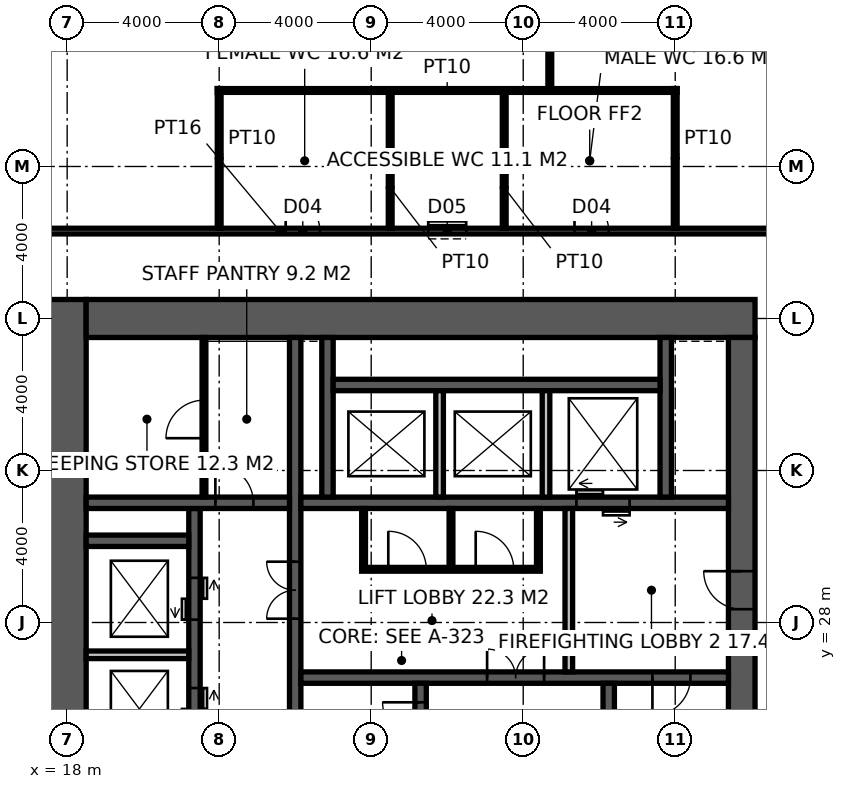
"""IFC4 building model, lengths in metres.
Left out: names, types, materials, properties, quantities, classifications, styles, units other than length and angle.
Written with IfcOpenShell. Run it as: python <this file> out.ifc"""

import sys

from ifc_helpers import new_model, si_unit, direction, frame, frame_2d, origin, place, context, subcontext, project, spatial, rectangle, extrude, element, fill, save


model = new_model("IFC4")
c1 = context("Model", 3, precision=1e-05, world=origin(), true_north=direction((0.0, 1.0)))
c2 = subcontext(c1, "Body", "Model", "MODEL_VIEW")
j1 = project(units=[si_unit("LENGTHUNIT", "METRE"), si_unit("PLANEANGLEUNIT", "RADIAN")], contexts=[c1])
p1 = place(None, origin())
s1 = spatial("IfcSite", under=j1, at=p1, CompositionType="ELEMENT")
p2 = place(p1, origin())
s2 = spatial("IfcBuilding", under=s1, at=p2, CompositionType="ELEMENT")
p3 = place(p2, frame((0.0, 0.0, 109.4)))
s3 = spatial("IfcBuildingStorey", under=s2, at=p3, CompositionType="ELEMENT", Elevation=109.4)
p4 = place(p3, frame((18.0, 17.5, -0.15), z_axis=(0.0, 0.0, 1.0), x_axis=(0.0, 1.0, 0.0)))
e1 = element("IfcWall", 1, at=p4, inside=s3, PredefinedType="SHEAR", context=c2, shape_type="SweptSolid", body=[
    extrude(rectangle(XDim=19.0, YDim=1.0, at=frame_2d((9.5, 0.0))), origin(), (0.0, 0.0, 1.0), 4.0),
])
p5 = place(p3, frame((18.5, 36.0, -0.15), z_axis=(0.0, 0.0, 1.0), x_axis=(1.0, 0.0, 0.0)))
e2 = element("IfcWall", 2, at=p5, inside=s3, PredefinedType="SHEAR", context=c2, shape_type="SweptSolid", body=[
    extrude(rectangle(XDim=17.6, YDim=1.0, at=frame_2d((8.8, 0.0))), origin(), (0.0, 0.0, 1.0), 4.0),
])
p6 = place(p3, frame((35.75, 18.5, -0.15), z_axis=(0.0, 0.0, 1.0), x_axis=(0.0, 1.0, 0.0)))
e3 = element("IfcWall", 3, at=p6, inside=s3, PredefinedType="SHEAR", context=c2, shape_type="SweptSolid", body=[
    extrude(rectangle(XDim=17.0, YDim=0.7, at=frame_2d((8.5, 0.0))), origin(), (0.0, 0.0, 1.0), 4.0),
])
p7 = place(p6, frame((9.85, 0.0, 0.15)))
e4 = element("IfcOpeningElement", 4, at=p7, cuts=e3, PredefinedType="OPENING", context=c2, shape_type="SweptSolid", body=[
    extrude(rectangle(XDim=1.0, YDim=2.2, at=frame_2d((0.5, 1.1))), frame((0.0, 0.36, 0.0), z_axis=(0.0, -1.0, 0.0), x_axis=(1.0, 0.0, 0.0)), (0.0, 0.0, 1.0), 0.72),
])
p8 = place(p3, frame((24.0, 18.5, -0.15), z_axis=(0.0, 0.0, 1.0), x_axis=(0.0, 1.0, 0.0)))
e5 = element("IfcWall", 5, at=p8, inside=s3, PredefinedType="SHEAR", context=c2, shape_type="SweptSolid", body=[
    extrude(rectangle(XDim=17.0, YDim=0.3, at=frame_2d((8.5, 0.0))), origin(), (0.0, 0.0, 1.0), 4.0),
])
p9 = place(p8, frame((9.6, 0.0, 0.15)))
e6 = element("IfcOpeningElement", 6, at=p9, cuts=e5, PredefinedType="OPENING", context=c2, shape_type="SweptSolid", body=[
    extrude(rectangle(XDim=1.5, YDim=2.4, at=frame_2d((0.75, 1.2))), frame((0.0, 0.16, 0.0), z_axis=(0.0, -1.0, 0.0), x_axis=(1.0, 0.0, 0.0)), (0.0, 0.0, 1.0), 0.32),
])
p10 = place(p3, frame((24.15, 26.55, -0.15), z_axis=(0.0, 0.0, 1.0), x_axis=(1.0, 0.0, 0.0)))
e7 = element("IfcWall", 7, at=p10, inside=s3, PredefinedType="SHEAR", context=c2, shape_type="SweptSolid", body=[
    extrude(rectangle(XDim=11.25, YDim=0.3, at=frame_2d((5.625, 0.0))), origin(), (0.0, 0.0, 1.0), 4.0),
])
p11 = place(p10, frame((9.25, 0.0, 0.15)))
e8 = element("IfcOpeningElement", 8, at=p11, cuts=e7, PredefinedType="OPENING", context=c2, shape_type="SweptSolid", body=[
    extrude(rectangle(XDim=1.0, YDim=2.2, at=frame_2d((0.5, 1.1))), frame((0.0, 0.16, 0.0), z_axis=(0.0, -1.0, 0.0), x_axis=(1.0, 0.0, 0.0)), (0.0, 0.0, 1.0), 0.32),
])
p12 = place(p10, frame((4.9, 0.0, 0.15)))
e9 = element("IfcOpeningElement", 9, at=p12, cuts=e7, PredefinedType="OPENING", context=c2, shape_type="SweptSolid", body=[
    extrude(rectangle(XDim=1.5, YDim=2.4, at=frame_2d((0.75, 1.2))), frame((0.0, 0.16, 0.0), z_axis=(0.0, -1.0, 0.0), x_axis=(1.0, 0.0, 0.0)), (0.0, 0.0, 1.0), 0.32),
])
p13 = place(p3, frame((27.3, 18.5, -0.15), z_axis=(0.0, 0.0, 1.0), x_axis=(0.0, 1.0, 0.0)))
e10 = element("IfcWall", 10, at=p13, inside=s3, PredefinedType="SHEAR", context=c2, shape_type="SweptSolid", body=[
    extrude(rectangle(XDim=7.9, YDim=0.3, at=frame_2d((3.95, 0.0))), origin(), (0.0, 0.0, 1.0), 4.0),
])
p14 = place(p13, frame((6.4, 0.0, 0.15)))
e11 = element("IfcOpeningElement", 11, at=p14, cuts=e10, PredefinedType="OPENING", context=c2, shape_type="SweptSolid", body=[
    extrude(rectangle(XDim=1.0, YDim=2.2, at=frame_2d((0.5, 1.1))), frame((0.0, 0.16, 0.0), z_axis=(0.0, -1.0, 0.0), x_axis=(1.0, 0.0, 0.0)), (0.0, 0.0, 1.0), 0.32),
])
p15 = place(p3, frame((32.25, 18.5, -0.15), z_axis=(0.0, 0.0, 1.0), x_axis=(0.0, 1.0, 0.0)))
e12 = element("IfcWall", 12, at=p15, inside=s3, PredefinedType="SHEAR", context=c2, shape_type="SweptSolid", body=[
    extrude(rectangle(XDim=7.9, YDim=0.3, at=frame_2d((3.95, 0.0))), origin(), (0.0, 0.0, 1.0), 4.0),
])
p16 = place(p3, frame((24.15, 31.15, -0.15), z_axis=(0.0, 0.0, 1.0), x_axis=(1.0, 0.0, 0.0)))
e13 = element("IfcWall", 13, at=p16, inside=s3, PredefinedType="SHEAR", context=c2, shape_type="SweptSolid", body=[
    extrude(rectangle(XDim=11.25, YDim=0.3, at=frame_2d((5.625, 0.0))), origin(), (0.0, 0.0, 1.0), 4.0),
])
p17 = place(p16, frame((7.25, 0.0, 0.15)))
e14 = element("IfcOpeningElement", 14, at=p17, cuts=e13, PredefinedType="OPENING", context=c2, shape_type="SweptSolid", body=[
    extrude(rectangle(XDim=1.4, YDim=2.4, at=frame_2d((0.7, 1.2))), frame((0.0, 0.16, 0.0), z_axis=(0.0, -1.0, 0.0), x_axis=(1.0, 0.0, 0.0)), (0.0, 0.0, 1.0), 0.32),
])
p18 = place(p3, frame((21.35, 18.5, -0.15), z_axis=(0.0, 0.0, 1.0), x_axis=(0.0, 1.0, 0.0)))
e15 = element("IfcWall", 15, at=p18, inside=s3, PredefinedType="SHEAR", context=c2, shape_type="SweptSolid", body=[
    extrude(rectangle(XDim=12.5, YDim=0.3, at=frame_2d((6.25, 0.0))), origin(), (0.0, 0.0, 1.0), 4.0),
])
p19 = place(p18, frame((0.875, 0.0, 0.15)))
e16 = element("IfcOpeningElement", 16, at=p19, cuts=e15, PredefinedType="OPENING", context=c2, shape_type="SweptSolid", body=[
    extrude(rectangle(XDim=1.1, YDim=2.2, at=frame_2d((0.55, 1.1))), frame((0.0, 0.16, 0.0), z_axis=(0.0, -1.0, 0.0), x_axis=(1.0, 0.0, 0.0)), (0.0, 0.0, 1.0), 0.32),
])
p20 = place(p18, frame((3.825, 0.0, 0.15)))
e17 = element("IfcOpeningElement", 17, at=p20, cuts=e15, PredefinedType="OPENING", context=c2, shape_type="SweptSolid", body=[
    extrude(rectangle(XDim=1.1, YDim=2.2, at=frame_2d((0.55, 1.1))), frame((0.0, 0.16, 0.0), z_axis=(0.0, -1.0, 0.0), x_axis=(1.0, 0.0, 0.0)), (0.0, 0.0, 1.0), 0.32),
])
p21 = place(p18, frame((6.675, 0.0, 0.15)))
e18 = element("IfcOpeningElement", 18, at=p21, cuts=e15, PredefinedType="OPENING", context=c2, shape_type="SweptSolid", body=[
    extrude(rectangle(XDim=1.1, YDim=2.2, at=frame_2d((0.55, 1.1))), frame((0.0, 0.16, 0.0), z_axis=(0.0, -1.0, 0.0), x_axis=(1.0, 0.0, 0.0)), (0.0, 0.0, 1.0), 0.32),
])
p22 = place(p18, frame((9.575, 0.0, 0.15)))
e19 = element("IfcOpeningElement", 19, at=p22, cuts=e15, PredefinedType="OPENING", context=c2, shape_type="SweptSolid", body=[
    extrude(rectangle(XDim=1.1, YDim=2.2, at=frame_2d((0.55, 1.1))), frame((0.0, 0.16, 0.0), z_axis=(0.0, -1.0, 0.0), x_axis=(1.0, 0.0, 0.0)), (0.0, 0.0, 1.0), 0.32),
])
p23 = place(p3, frame((18.5, 31.15, -0.15), z_axis=(0.0, 0.0, 1.0), x_axis=(1.0, 0.0, 0.0)))
e20 = element("IfcWall", 20, at=p23, inside=s3, PredefinedType="SHEAR", context=c2, shape_type="SweptSolid", body=[
    extrude(rectangle(XDim=5.35, YDim=0.3, at=frame_2d((2.675, 0.0))), origin(), (0.0, 0.0, 1.0), 4.0),
])
p24 = place(p23, frame((3.4, 0.0, 0.15)))
e21 = element("IfcOpeningElement", 21, at=p24, cuts=e20, PredefinedType="OPENING", context=c2, shape_type="SweptSolid", body=[
    extrude(rectangle(XDim=1.0, YDim=2.2, at=frame_2d((0.5, 1.1))), frame((0.0, 0.16, 0.0), z_axis=(0.0, -1.0, 0.0), x_axis=(1.0, 0.0, 0.0)), (0.0, 0.0, 1.0), 0.32),
])
p25 = place(p3, frame((18.5, 30.15, -0.15), z_axis=(0.0, 0.0, 1.0), x_axis=(1.0, 0.0, 0.0)))
e22 = element("IfcWall", 22, at=p25, inside=s3, PredefinedType="SHEAR", context=c2, shape_type="SweptSolid", body=[
    extrude(rectangle(XDim=2.7, YDim=0.3, at=frame_2d((1.35, 0.0))), origin(), (0.0, 0.0, 1.0), 4.0),
])
for number, where, z_axis, x_axis in (
    (23, (24.85, 31.3, -0.15), (0.0, 0.0, 1.0), (0.0, 1.0, 0.0)),
    (24, (33.75, 31.3, -0.15), (0.0, 0.0, 1.0), (0.0, 1.0, 0.0)),
):
    element("IfcWall", number, at=place(p3, frame(where, z_axis=z_axis, x_axis=x_axis)), inside=s3, PredefinedType="SHEAR", context=c2, shape_type="SweptSolid", body=[
        extrude(rectangle(XDim=4.2, YDim=0.3, at=frame_2d((2.1, 0.0))), origin(), (0.0, 0.0, 1.0), 4.0),
    ])
p26 = place(p3, frame((25.0, 34.25, -0.15), z_axis=(0.0, 0.0, 1.0), x_axis=(1.0, 0.0, 0.0)))
e25 = element("IfcWall", 25, at=p26, inside=s3, PredefinedType="SHEAR", context=c2, shape_type="SweptSolid", body=[
    extrude(rectangle(XDim=8.6, YDim=0.3, at=frame_2d((4.3, 0.0))), origin(), (0.0, 0.0, 1.0), 4.0),
])
for number, where, z_axis, x_axis in (
    (26, (27.8, 31.3, -0.15), (0.0, 0.0, 1.0), (0.0, 1.0, 0.0)),
    (27, (30.6, 31.3, -0.15), (0.0, 0.0, 1.0), (0.0, 1.0, 0.0)),
):
    element("IfcWall", number, at=place(p3, frame(where, z_axis=z_axis, x_axis=x_axis)), inside=s3, PredefinedType="SOLIDWALL", context=c2, shape_type="SweptSolid", body=[
        extrude(rectangle(XDim=2.8, YDim=0.2, at=frame_2d((1.4, 0.0))), origin(), (0.0, 0.0, 1.0), 4.0),
    ])
p27 = place(p3, frame((18.5, 27.15, -0.15), z_axis=(0.0, 0.0, 1.0), x_axis=(1.0, 0.0, 0.0)))
e28 = element("IfcWall", 28, at=p27, inside=s3, PredefinedType="SOLIDWALL", context=c2, shape_type="SweptSolid", body=[
    extrude(rectangle(XDim=2.7, YDim=0.2, at=frame_2d((1.35, 0.0))), origin(), (0.0, 0.0, 1.0), 4.0),
])
p28 = place(p3, frame((31.2, 26.7, 0.0), z_axis=(0.0, 0.0, 1.0), x_axis=(0.0, 1.0, 0.0)))
e29 = element("IfcWall", 29, at=p28, inside=s3, PredefinedType="SOLIDWALL", context=c2, shape_type="SweptSolid", body=[
    extrude(rectangle(XDim=4.3, YDim=0.2, at=frame_2d((2.15, 0.0))), origin(), (0.0, 0.0, 1.0), 3.85),
])
p29 = place(p3, frame((21.6, 31.3, 0.0), z_axis=(0.0, 0.0, 1.0), x_axis=(0.0, 1.0, 0.0)))
e30 = element("IfcWall", 30, at=p29, inside=s3, PredefinedType="PARTITIONING", context=c2, shape_type="SweptSolid", body=[
    extrude(rectangle(XDim=4.2, YDim=0.1, at=frame_2d((2.1, 0.0))), origin(), (0.0, 0.0, 1.0), 3.85),
])
p30 = place(p29, frame((1.55, 0.0, 0.0)))
e31 = element("IfcOpeningElement", 31, at=p30, cuts=e30, PredefinedType="OPENING", context=c2, shape_type="SweptSolid", body=[
    extrude(rectangle(XDim=1.0, YDim=2.2, at=frame_2d((0.5, 1.1))), frame((0.0, 0.06, 0.0), z_axis=(0.0, -1.0, 0.0), x_axis=(1.0, 0.0, 0.0)), (0.0, 0.0, 1.0), 0.12),
])
p31 = place(p3, frame((25.75, 29.4, 0.0), z_axis=(0.0, 0.0, 1.0), x_axis=(1.0, 0.0, 0.0)))
e32 = element("IfcWall", 32, at=p31, inside=s3, PredefinedType="PARTITIONING", context=c2, shape_type="SweptSolid", body=[
    extrude(rectangle(XDim=4.7, YDim=0.1, at=frame_2d((2.35, 0.0))), origin(), (0.0, 0.0, 1.0), 3.85),
])
p32 = place(p31, frame((0.7, 0.0, 0.0)))
e33 = element("IfcOpeningElement", 33, at=p32, cuts=e32, PredefinedType="OPENING", context=c2, shape_type="SweptSolid", body=[
    extrude(rectangle(XDim=1.0, YDim=2.2, at=frame_2d((0.5, 1.1))), frame((0.0, 0.06, 0.0), z_axis=(0.0, -1.0, 0.0), x_axis=(1.0, 0.0, 0.0)), (0.0, 0.0, 1.0), 0.12),
])
p33 = place(p31, frame((3.0, 0.0, 0.0)))
e34 = element("IfcOpeningElement", 34, at=p33, cuts=e32, PredefinedType="OPENING", context=c2, shape_type="SweptSolid", body=[
    extrude(rectangle(XDim=1.0, YDim=2.2, at=frame_2d((0.5, 1.1))), frame((0.0, 0.06, 0.0), z_axis=(0.0, -1.0, 0.0), x_axis=(1.0, 0.0, 0.0)), (0.0, 0.0, 1.0), 0.12),
])
for number, where, z_axis, x_axis in (
    (35, (25.8, 29.45, 0.0), (0.0, 0.0, 1.0), (0.0, 1.0, 0.0)),
    (36, (30.4, 29.45, 0.0), (0.0, 0.0, 1.0), (0.0, 1.0, 0.0)),
    (37, (28.1, 29.45, 0.0), (0.0, 0.0, 1.0), (0.0, 1.0, 0.0)),
):
    element("IfcWall", number, at=place(p3, frame(where, z_axis=z_axis, x_axis=x_axis)), inside=s3, PredefinedType="PARTITIONING", context=c2, shape_type="SweptSolid", body=[
        extrude(rectangle(XDim=1.55, YDim=0.1, at=frame_2d((0.775, 0.0))), origin(), (0.0, 0.0, 1.0), 3.85),
    ])
p34 = place(p3, frame((17.5, 38.3, 0.0), z_axis=(0.0, 0.0, 1.0), x_axis=(1.0, 0.0, 0.0)))
e38 = element("IfcWall", 38, at=p34, inside=s3, PredefinedType="PARTITIONING", context=c2, shape_type="SweptSolid", body=[
    extrude(rectangle(XDim=20.325, YDim=0.15, at=frame_2d((10.163, 0.0))), origin(), (0.0, 0.0, 1.0), 3.85),
])
p35 = place(p34, frame((6.25, 0.0, 0.0)))
e39 = element("IfcOpeningElement", 39, at=p35, cuts=e38, PredefinedType="OPENING", context=c2, shape_type="SweptSolid", body=[
    extrude(rectangle(XDim=0.9, YDim=2.1, at=frame_2d((0.45, 1.05))), frame((0.0, 0.085, 0.0), z_axis=(0.0, -1.0, 0.0), x_axis=(1.0, 0.0, 0.0)), (0.0, 0.0, 1.0), 0.17),
])
p36 = place(p34, frame((10.0, 0.0, 0.0)))
e40 = element("IfcOpeningElement", 40, at=p36, cuts=e38, PredefinedType="OPENING", context=c2, shape_type="SweptSolid", body=[
    extrude(rectangle(XDim=1.0, YDim=2.1, at=frame_2d((0.5, 1.05))), frame((0.0, 0.085, 0.0), z_axis=(0.0, -1.0, 0.0), x_axis=(1.0, 0.0, 0.0)), (0.0, 0.0, 1.0), 0.17),
])
p37 = place(p34, frame((13.85, 0.0, 0.0)))
e41 = element("IfcOpeningElement", 41, at=p37, cuts=e38, PredefinedType="OPENING", context=c2, shape_type="SweptSolid", body=[
    extrude(rectangle(XDim=0.9, YDim=2.1, at=frame_2d((0.45, 1.05))), frame((0.0, 0.085, 0.0), z_axis=(0.0, -1.0, 0.0), x_axis=(1.0, 0.0, 0.0)), (0.0, 0.0, 1.0), 0.17),
])
for number, where, z_axis, x_axis in (
    (42, (22.0, 38.375, 0.0), (0.0, 0.0, 1.0), (0.0, 1.0, 0.0)),
    (43, (34.0, 38.375, 0.0), (0.0, 0.0, 1.0), (0.0, 1.0, 0.0)),
):
    element("IfcWall", number, at=place(p3, frame(where, z_axis=z_axis, x_axis=x_axis)), inside=s3, PredefinedType="PARTITIONING", context=c2, shape_type="SweptSolid", body=[
        extrude(rectangle(XDim=3.675, YDim=0.1, at=frame_2d((1.837, 0.0))), origin(), (0.0, 0.0, 1.0), 2.95),
    ])
p38 = place(p3, frame((21.95, 42.0, 0.0), z_axis=(0.0, 0.0, 1.0), x_axis=(1.0, 0.0, 0.0)))
e44 = element("IfcWall", 44, at=p38, inside=s3, PredefinedType="PARTITIONING", context=c2, shape_type="SweptSolid", body=[
    extrude(rectangle(XDim=12.1, YDim=0.1, at=frame_2d((6.05, 0.0))), origin(), (0.0, 0.0, 1.0), 3.85),
])
for number, where, z_axis, x_axis in (
    (45, (26.5, 38.375, 0.0), (0.0, 0.0, 1.0), (0.0, 1.0, 0.0)),
    (46, (29.5, 38.375, 0.0), (0.0, 0.0, 1.0), (0.0, 1.0, 0.0)),
):
    element("IfcWall", number, at=place(p3, frame(where, z_axis=z_axis, x_axis=x_axis)), inside=s3, PredefinedType="PARTITIONING", context=c2, shape_type="SweptSolid", body=[
        extrude(rectangle(XDim=3.575, YDim=0.1, at=frame_2d((1.788, 0.0))), origin(), (0.0, 0.0, 1.0), 3.85),
    ])
p39 = place(p3, frame((30.7, 42.0, 0.0), z_axis=(0.0, 0.0, 1.0), x_axis=(0.0, 1.0, 0.0)))
e47 = element("IfcWall", 47, at=p39, inside=s3, PredefinedType="PARTITIONING", context=c2, shape_type="SweptSolid", body=[
    extrude(rectangle(XDim=9.7, YDim=0.1, at=frame_2d((4.85, 0.0))), origin(), (0.0, 0.0, 1.0), 3.85),
])
p40 = place(p39, frame((4.35, 0.0, 0.0)))
e48 = element("IfcOpeningElement", 48, at=p40, cuts=e47, PredefinedType="OPENING", context=c2, shape_type="SweptSolid", body=[
    extrude(rectangle(XDim=1.0, YDim=2.2, at=frame_2d((0.5, 1.1))), frame((0.0, 0.06, 0.0), z_axis=(0.0, -1.0, 0.0), x_axis=(1.0, 0.0, 0.0)), (0.0, 0.0, 1.0), 0.12),
])
p41 = place(p14, origin())
e49 = element("IfcDoor", 49, at=p41, inside=s3, OperationType="SINGLE_SWING_RIGHT", PredefinedType="DOOR", context=c2, shape_type="SweptSolid", body=[
    extrude(rectangle(XDim=1.0, YDim=2.2, at=frame_2d((0.5, 1.1))), frame((0.0, 0.025, 0.0), z_axis=(0.0, -1.0, 0.0), x_axis=(1.0, 0.0, 0.0)), (0.0, 0.0, 1.0), 0.05),
])
fill(e11, e49)
p42 = place(p11, frame((1.0, 0.0, 0.0), z_axis=(0.0, 0.0, 1.0), x_axis=(-1.0, 0.0, 0.0)))
e50 = element("IfcDoor", 50, at=p42, inside=s3, OperationType="SINGLE_SWING_RIGHT", PredefinedType="DOOR", context=c2, shape_type="SweptSolid", body=[
    extrude(rectangle(XDim=1.0, YDim=2.2, at=frame_2d((0.5, 1.1))), frame((0.0, 0.025, 0.0), z_axis=(0.0, -1.0, 0.0), x_axis=(1.0, 0.0, 0.0)), (0.0, 0.0, 1.0), 0.05),
])
fill(e8, e50)
p43 = place(p7, origin())
e51 = element("IfcDoor", 51, at=p43, inside=s3, OperationType="SINGLE_SWING_RIGHT", PredefinedType="DOOR", context=c2, shape_type="SweptSolid", body=[
    extrude(rectangle(XDim=1.0, YDim=2.2, at=frame_2d((0.5, 1.1))), frame((0.0, 0.025, 0.0), z_axis=(0.0, -1.0, 0.0), x_axis=(1.0, 0.0, 0.0)), (0.0, 0.0, 1.0), 0.05),
])
fill(e4, e51)
p44 = place(p12, origin())
e52 = element("IfcDoor", 52, at=p44, inside=s3, OperationType="DOUBLE_DOOR_DOUBLE_SWING", PredefinedType="DOOR", context=c2, shape_type="SweptSolid", body=[
    extrude(rectangle(XDim=1.5, YDim=2.4, at=frame_2d((0.75, 1.2))), frame((0.0, 0.025, 0.0), z_axis=(0.0, -1.0, 0.0), x_axis=(1.0, 0.0, 0.0)), (0.0, 0.0, 1.0), 0.05),
])
fill(e9, e52)
p45 = place(p9, origin())
e53 = element("IfcDoor", 53, at=p45, inside=s3, OperationType="DOUBLE_DOOR_DOUBLE_SWING", PredefinedType="DOOR", context=c2, shape_type="SweptSolid", body=[
    extrude(rectangle(XDim=1.5, YDim=2.4, at=frame_2d((0.75, 1.2))), frame((0.0, 0.025, 0.0), z_axis=(0.0, -1.0, 0.0), x_axis=(1.0, 0.0, 0.0)), (0.0, 0.0, 1.0), 0.05),
])
fill(e6, e53)
p46 = place(p24, origin())
e54 = element("IfcDoor", 54, at=p46, inside=s3, OperationType="SINGLE_SWING_LEFT", PredefinedType="DOOR", context=c2, shape_type="SweptSolid", body=[
    extrude(rectangle(XDim=1.0, YDim=2.2, at=frame_2d((0.5, 1.1))), frame((0.0, 0.025, 0.0), z_axis=(0.0, -1.0, 0.0), x_axis=(1.0, 0.0, 0.0)), (0.0, 0.0, 1.0), 0.05),
])
fill(e21, e54)
p47 = place(p30, origin())
e55 = element("IfcDoor", 55, at=p47, inside=s3, OperationType="SINGLE_SWING_LEFT", PredefinedType="DOOR", context=c2, shape_type="SweptSolid", body=[
    extrude(rectangle(XDim=1.0, YDim=2.2, at=frame_2d((0.5, 1.1))), frame((0.0, 0.025, 0.0), z_axis=(0.0, -1.0, 0.0), x_axis=(1.0, 0.0, 0.0)), (0.0, 0.0, 1.0), 0.05),
])
fill(e31, e55)
p48 = place(p32, origin())
e56 = element("IfcDoor", 56, at=p48, inside=s3, OperationType="SINGLE_SWING_LEFT", PredefinedType="DOOR", context=c2, shape_type="SweptSolid", body=[
    extrude(rectangle(XDim=1.0, YDim=2.2, at=frame_2d((0.5, 1.1))), frame((0.0, 0.025, 0.0), z_axis=(0.0, -1.0, 0.0), x_axis=(1.0, 0.0, 0.0)), (0.0, 0.0, 1.0), 0.05),
])
fill(e33, e56)
p49 = place(p33, origin())
e57 = element("IfcDoor", 57, at=p49, inside=s3, OperationType="SINGLE_SWING_LEFT", PredefinedType="DOOR", context=c2, shape_type="SweptSolid", body=[
    extrude(rectangle(XDim=1.0, YDim=2.2, at=frame_2d((0.5, 1.1))), frame((0.0, 0.025, 0.0), z_axis=(0.0, -1.0, 0.0), x_axis=(1.0, 0.0, 0.0)), (0.0, 0.0, 1.0), 0.05),
])
fill(e34, e57)
p50 = place(p35, origin())
e58 = element("IfcDoor", 58, at=p50, inside=s3, OperationType="SINGLE_SWING_LEFT", PredefinedType="DOOR", context=c2, shape_type="SweptSolid", body=[
    extrude(rectangle(XDim=0.9, YDim=2.1, at=frame_2d((0.45, 1.05))), frame((0.0, 0.025, 0.0), z_axis=(0.0, -1.0, 0.0), x_axis=(1.0, 0.0, 0.0)), (0.0, 0.0, 1.0), 0.05),
])
fill(e39, e58)
p51 = place(p36, origin())
e59 = element("IfcDoor", 59, at=p51, inside=s3, OperationType="SLIDING_TO_LEFT", PredefinedType="DOOR", context=c2, shape_type="SweptSolid", body=[
    extrude(rectangle(XDim=1.0, YDim=2.1, at=frame_2d((0.5, 1.05))), frame((0.0, 0.025, 0.0), z_axis=(0.0, -1.0, 0.0), x_axis=(1.0, 0.0, 0.0)), (0.0, 0.0, 1.0), 0.05),
])
fill(e40, e59)
p52 = place(p37, origin())
e60 = element("IfcDoor", 60, at=p52, inside=s3, OperationType="SINGLE_SWING_LEFT", PredefinedType="DOOR", context=c2, shape_type="SweptSolid", body=[
    extrude(rectangle(XDim=0.9, YDim=2.1, at=frame_2d((0.45, 1.05))), frame((0.0, 0.025, 0.0), z_axis=(0.0, -1.0, 0.0), x_axis=(1.0, 0.0, 0.0)), (0.0, 0.0, 1.0), 0.05),
])
fill(e41, e60)
p53 = place(p17, origin())
e61 = element("IfcDoor", 61, at=p53, inside=s3, OperationType="DOUBLE_DOOR_SLIDING", PredefinedType="DOOR", context=c2, shape_type="SweptSolid", body=[
    extrude(rectangle(XDim=1.4, YDim=2.4, at=frame_2d((0.7, 1.2))), frame((0.0, 0.025, 0.0), z_axis=(0.0, -1.0, 0.0), x_axis=(1.0, 0.0, 0.0)), (0.0, 0.0, 1.0), 0.05),
])
fill(e14, e61)
p54 = place(p21, origin())
e62 = element("IfcDoor", 62, at=p54, inside=s3, OperationType="DOUBLE_DOOR_SLIDING", PredefinedType="DOOR", context=c2, shape_type="SweptSolid", body=[
    extrude(rectangle(XDim=1.1, YDim=2.2, at=frame_2d((0.55, 1.1))), frame((0.0, 0.025, 0.0), z_axis=(0.0, -1.0, 0.0), x_axis=(1.0, 0.0, 0.0)), (0.0, 0.0, 1.0), 0.05),
])
fill(e18, e62)
p55 = place(p22, origin())
e63 = element("IfcDoor", 63, at=p55, inside=s3, OperationType="DOUBLE_DOOR_SLIDING", PredefinedType="DOOR", context=c2, shape_type="SweptSolid", body=[
    extrude(rectangle(XDim=1.1, YDim=2.2, at=frame_2d((0.55, 1.1))), frame((0.0, 0.025, 0.0), z_axis=(0.0, -1.0, 0.0), x_axis=(1.0, 0.0, 0.0)), (0.0, 0.0, 1.0), 0.05),
])
fill(e19, e63)
save(model, sys.argv[1])
